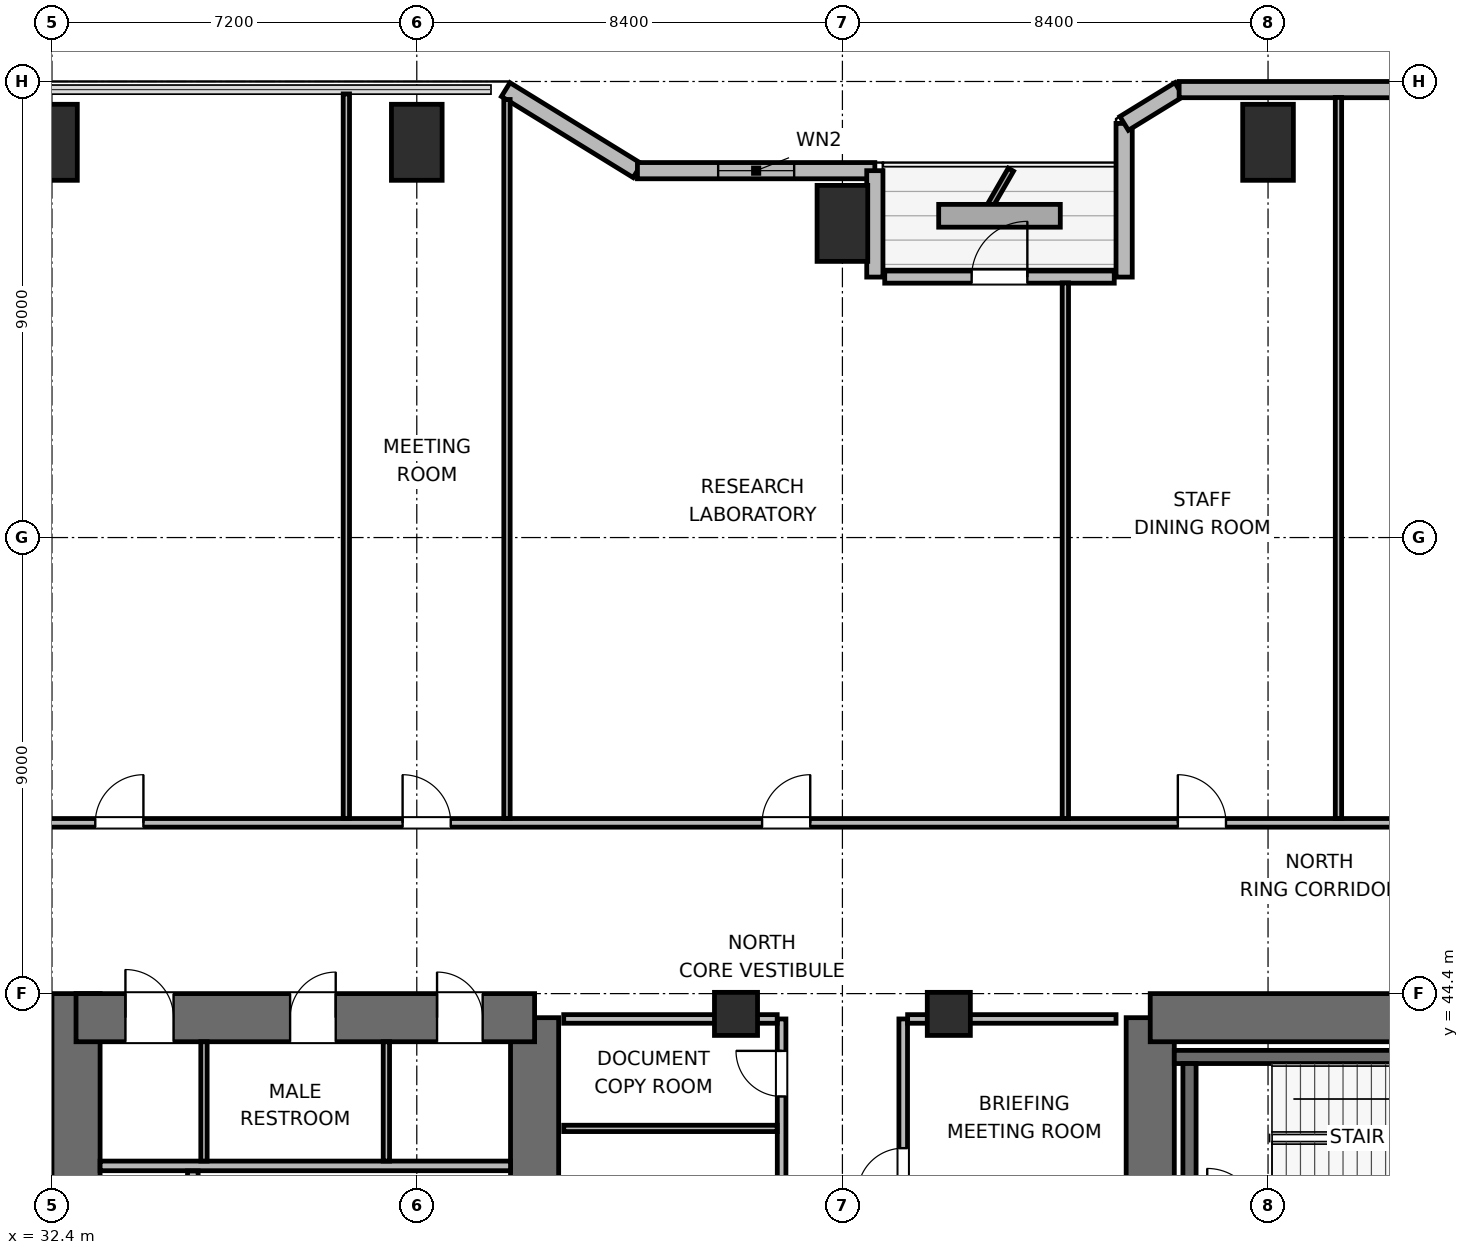
"""IFC4 building model, lengths in metres.
Left out: names, types, materials, properties, quantities, classifications, styles, units other than length and angle.
Written with IfcOpenShell. Run it as: python <this file> out.ifc"""

import sys

from ifc_helpers import new_model, si_unit, direction, frame, frame_2d, origin, origin_2d, place, context, subcontext, project, spatial, rectangle, extrude, element, fill, save


model = new_model("IFC4")
c1 = context("Model", 3, precision=1e-05, world=origin(), true_north=direction((0.0, 1.0)))
c2 = subcontext(c1, "Body", "Model", "MODEL_VIEW")
j1 = project(units=[si_unit("LENGTHUNIT", "METRE"), si_unit("PLANEANGLEUNIT", "RADIAN")], contexts=[c1])
p1 = place(None, origin())
s1 = spatial("IfcSite", under=j1, at=p1, CompositionType="ELEMENT")
p2 = place(p1, origin())
s2 = spatial("IfcBuilding", under=s1, at=p2, CompositionType="ELEMENT")
p3 = place(p2, frame((0.0, 0.0, 85.8)))
s3 = spatial("IfcBuildingStorey", under=s2, at=p3, CompositionType="ELEMENT", Elevation=85.8)
p4 = place(p3, frame((32.875, 27.6, 0.0), z_axis=(0.0, 0.0, 1.0), x_axis=(0.0, 1.0, 0.0)))
e1 = element("IfcWall", 1, at=p4, inside=s3, PredefinedType="SHEAR", context=c2, shape_type="SweptSolid", body=[
    extrude(rectangle(XDim=16.8, YDim=0.95, at=frame_2d((8.4, 0.0))), origin(), (0.0, 0.0, 1.0), 3.9),
])
p5 = place(p3, frame((41.925, 37.8, 0.0), z_axis=(0.0, 0.0, 1.0), x_axis=(0.0, 1.0, 0.0)))
e2 = element("IfcWall", 2, at=p5, inside=s3, PredefinedType="SHEAR", context=c2, shape_type="SweptSolid", body=[
    extrude(rectangle(XDim=6.125, YDim=0.95, at=frame_2d((3.062, 0.0))), origin(), (0.0, 0.0, 1.0), 3.9),
])
p6 = place(p3, frame((32.875, 43.925, 0.0), z_axis=(0.0, 0.0, 1.0), x_axis=(1.0, 0.0, 0.0)))
e3 = element("IfcWall", 3, at=p6, inside=s3, PredefinedType="SHEAR", context=c2, shape_type="SweptSolid", body=[
    extrude(rectangle(XDim=9.05, YDim=0.95, at=frame_2d((4.525, 0.0))), origin(), (0.0, 0.0, 1.0), 3.9),
])
p7 = place(p6, frame((0.975, 0.0, 0.0)))
e4 = element("IfcOpeningElement", 4, at=p7, cuts=e3, PredefinedType="OPENING", context=c2, shape_type="SweptSolid", body=[
    extrude(rectangle(XDim=0.95, YDim=2.04, at=frame_2d((0.475, 1.02))), frame((0.0, 0.485, 0.0), z_axis=(0.0, -1.0, 0.0), x_axis=(1.0, 0.0, 0.0)), (0.0, 0.0, 1.0), 0.97),
])
p8 = place(p6, frame((4.225, 0.0, 0.0)))
e5 = element("IfcOpeningElement", 5, at=p8, cuts=e3, PredefinedType="OPENING", context=c2, shape_type="SweptSolid", body=[
    extrude(rectangle(XDim=0.9, YDim=2.02, at=frame_2d((0.45, 1.01))), frame((0.0, 0.485, 0.0), z_axis=(0.0, -1.0, 0.0), x_axis=(1.0, 0.0, 0.0)), (0.0, 0.0, 1.0), 0.97),
])
p9 = place(p6, frame((7.125, 0.0, 0.0)))
e6 = element("IfcOpeningElement", 6, at=p9, cuts=e3, PredefinedType="OPENING", context=c2, shape_type="SweptSolid", body=[
    extrude(rectangle(XDim=0.9, YDim=2.02, at=frame_2d((0.45, 1.01))), frame((0.0, 0.485, 0.0), z_axis=(0.0, -1.0, 0.0), x_axis=(1.0, 0.0, 0.0)), (0.0, 0.0, 1.0), 0.97),
])
p10 = place(p3, frame((54.075, 38.0, 0.0), z_axis=(0.0, 0.0, 1.0), x_axis=(0.0, 1.0, 0.0)))
e7 = element("IfcWall", 7, at=p10, inside=s3, PredefinedType="SHEAR", context=c2, shape_type="SweptSolid", body=[
    extrude(rectangle(XDim=5.925, YDim=0.95, at=frame_2d((2.962, 0.0))), origin(), (0.0, 0.0, 1.0), 3.9),
])
p11 = place(p3, frame((54.075, 43.925, 0.0), z_axis=(0.0, 0.0, 1.0), x_axis=(1.0, 0.0, 0.0)))
e8 = element("IfcWall", 8, at=p11, inside=s3, PredefinedType="SHEAR", context=c2, shape_type="SweptSolid", body=[
    extrude(rectangle(XDim=9.05, YDim=0.95, at=frame_2d((4.525, 0.0))), origin(), (0.0, 0.0, 1.0), 3.9),
])
p12 = place(p3, frame((54.55, 43.15, 0.0), z_axis=(0.0, 0.0, 1.0), x_axis=(1.0, 0.0, 0.0)))
e9 = element("IfcWall", 9, at=p12, inside=s3, PredefinedType="SHEAR", context=c2, shape_type="SweptSolid", body=[
    extrude(rectangle(XDim=8.1, YDim=0.26, at=frame_2d((4.05, 0.0))), origin(), (0.0, 0.0, 1.0), 3.9),
])
p13 = place(p3, frame((54.85, 40.08, 0.0), z_axis=(0.0, 0.0, 1.0), x_axis=(0.0, 1.0, 0.0)))
e10 = element("IfcWall", 10, at=p13, inside=s3, PredefinedType="SHEAR", context=c2, shape_type="SweptSolid", body=[
    extrude(rectangle(XDim=2.94, YDim=0.26, at=frame_2d((1.47, 0.0))), origin(), (0.0, 0.0, 1.0), 3.9),
])
for number, where, z_axis, x_axis in (
    (11, (32.4, 61.2, 0.0), (0.0, 0.0, 1.0), (1.0, 0.0, 0.0)),
    (12, (39.6, 61.2, 0.0), (0.0, 0.0, 1.0), (1.0, 0.0, 0.0)),
    (13, (48.0, 59.6, 0.0), (0.0, 0.0, 1.0), (1.0, 0.0, 0.0)),
    (14, (56.4, 61.2, 0.0), (0.0, 0.0, 1.0), (1.0, 0.0, 0.0)),
):
    element("IfcColumn", number, at=place(p3, frame(where, z_axis=z_axis, x_axis=x_axis)), inside=s3, PredefinedType="COLUMN", context=c2, shape_type="SweptSolid", body=[
        extrude(rectangle(XDim=1.0, YDim=1.5, at=origin_2d()), origin(), (0.0, 0.0, 1.0), 3.9),
    ])
for number, where, z_axis, x_axis in (
    (15, (45.9, 44.0, 0.0), (0.0, 0.0, 1.0), (1.0, 0.0, 0.0)),
    (16, (50.1, 44.0, 0.0), (0.0, 0.0, 1.0), (1.0, 0.0, 0.0)),
):
    element("IfcColumn", number, at=place(p3, frame(where, z_axis=z_axis, x_axis=x_axis)), inside=s3, PredefinedType="COLUMN", context=c2, shape_type="SweptSolid", body=[
        extrude(rectangle(XDim=0.85, YDim=0.85, at=origin_2d()), origin(), (0.0, 0.0, 1.0), 3.9),
    ])
p14 = place(p3, frame((41.355, 62.24, 0.0), z_axis=(0.0, 0.0, 1.0), x_axis=(0.851630857047, -0.524142044989, 0.0)))
e17 = element("IfcWall", 17, at=p14, inside=s3, PredefinedType="SOLIDWALL", context=c2, shape_type="SweptSolid", body=[
    extrude(rectangle(XDim=3.053, YDim=0.32, at=frame_2d((1.526, 0.0))), origin(), (0.0, 0.0, 1.0), 2.875),
])
p15 = place(p3, frame((43.955, 60.64, 0.0), z_axis=(0.0, 0.0, 1.0), x_axis=(1.0, 0.0, 0.0)))
e18 = element("IfcWall", 18, at=p15, inside=s3, PredefinedType="SOLIDWALL", context=c2, shape_type="SweptSolid", body=[
    extrude(rectangle(XDim=4.685, YDim=0.32, at=frame_2d((2.343, 0.0))), origin(), (0.0, 0.0, 1.0), 2.875),
])
p16 = place(p15, frame((1.593, 0.0, 0.85)))
e19 = element("IfcOpeningElement", 19, at=p16, cuts=e18, PredefinedType="OPENING", context=c2, shape_type="SweptSolid", body=[
    extrude(rectangle(XDim=1.5, YDim=1.1, at=frame_2d((0.75, 0.55))), frame((0.0, 0.17, 0.0), z_axis=(0.0, -1.0, 0.0), x_axis=(1.0, 0.0, 0.0)), (0.0, 0.0, 1.0), 0.34),
])
p17 = place(p3, frame((48.64, 60.64, 0.0), z_axis=(0.0, 0.0, 1.0), x_axis=(0.0, -1.0, 0.0)))
e20 = element("IfcWall", 20, at=p17, inside=s3, PredefinedType="SOLIDWALL", context=c2, shape_type="SweptSolid", body=[
    extrude(rectangle(XDim=2.1, YDim=0.32, at=frame_2d((1.05, 0.0))), origin(), (0.0, 0.0, 1.0), 2.875),
])
p18 = place(p3, frame((48.835, 58.54, 0.0), z_axis=(0.0, 0.0, 1.0), x_axis=(1.0, 0.0, 0.0)))
e21 = element("IfcWall", 21, at=p18, inside=s3, PredefinedType="SOLIDWALL", context=c2, shape_type="SweptSolid", body=[
    extrude(rectangle(XDim=4.53, YDim=0.24, at=frame_2d((2.265, 0.0))), origin(), (0.0, 0.0, 1.0), 3.64),
])
p19 = place(p18, frame((1.715, 0.0, 0.0)))
e22 = element("IfcOpeningElement", 22, at=p19, cuts=e21, PredefinedType="OPENING", context=c2, shape_type="SweptSolid", body=[
    extrude(rectangle(XDim=1.1, YDim=2.04, at=frame_2d((0.55, 1.02))), frame((0.0, 0.13, 0.0), z_axis=(0.0, -1.0, 0.0), x_axis=(1.0, 0.0, 0.0)), (0.0, 0.0, 1.0), 0.26),
])
p20 = place(p3, frame((53.56, 58.54, 0.0), z_axis=(0.0, 0.0, 1.0), x_axis=(0.0, 1.0, 0.0)))
e23 = element("IfcWall", 23, at=p20, inside=s3, PredefinedType="SOLIDWALL", context=c2, shape_type="SweptSolid", body=[
    extrude(rectangle(XDim=3.032, YDim=0.32, at=frame_2d((1.516, 0.0))), origin(), (0.0, 0.0, 1.0), 2.875),
])
p21 = place(p3, frame((53.56, 61.573, 0.0), z_axis=(0.0, 0.0, 1.0), x_axis=(0.851776724646, 0.523904964045, 0.0)))
e24 = element("IfcWall", 24, at=p21, inside=s3, PredefinedType="SOLIDWALL", context=c2, shape_type="SweptSolid", body=[
    extrude(rectangle(XDim=1.274, YDim=0.32, at=frame_2d((0.637, 0.0))), origin(), (0.0, 0.0, 1.0), 3.64),
])
p22 = place(p3, frame((54.645, 62.24, 0.0), z_axis=(0.0, 0.0, 1.0), x_axis=(1.0, 0.0, 0.0)))
e25 = element("IfcWall", 25, at=p22, inside=s3, PredefinedType="SOLIDWALL", context=c2, shape_type="SweptSolid", body=[
    extrude(rectangle(XDim=10.734, YDim=0.32, at=frame_2d((5.367, 0.0))), origin(), (0.0, 0.0, 1.0), 3.64),
])
p23 = place(p3, frame((33.35, 41.0, 0.0), z_axis=(0.0, 0.0, 1.0), x_axis=(1.0, 0.0, 0.0)))
e26 = element("IfcWall", 26, at=p23, inside=s3, PredefinedType="PLUMBINGWALL", context=c2, shape_type="SweptSolid", body=[
    extrude(rectangle(XDim=8.1, YDim=0.19, at=frame_2d((4.05, 0.0))), origin(), (0.0, 0.0, 1.0), 3.64),
])
for number, where, z_axis, x_axis in (
    (27, (35.4, 41.095, 0.0), (0.0, 0.0, 1.0), (0.0, 1.0, 0.0)),
    (28, (39.0, 41.095, 0.0), (0.0, 0.0, 1.0), (0.0, 1.0, 0.0)),
):
    element("IfcWall", number, at=place(p3, frame(where, z_axis=z_axis, x_axis=x_axis)), inside=s3, PredefinedType="PARTITIONING", context=c2, shape_type="SweptSolid", body=[
        extrude(rectangle(XDim=2.355, YDim=0.125, at=frame_2d((1.177, 0.0))), origin(), (0.0, 0.0, 1.0), 3.64),
    ])
p24 = place(p3, frame((35.18, 39.74, 0.0), z_axis=(0.0, 0.0, 1.0), x_axis=(0.0, 1.0, 0.0)))
e29 = element("IfcWall", 29, at=p24, inside=s3, PredefinedType="PARTITIONING", context=c2, shape_type="SweptSolid", body=[
    extrude(rectangle(XDim=1.16, YDim=0.21, at=frame_2d((0.58, 0.0))), origin(), (0.0, 0.0, 1.0), 3.64),
])
p25 = place(p24, frame((0.105, 0.0, 0.0)))
e30 = element("IfcOpeningElement", 30, at=p25, cuts=e29, PredefinedType="OPENING", context=c2, shape_type="SweptSolid", body=[
    extrude(rectangle(XDim=0.95, YDim=2.04, at=frame_2d((0.475, 1.02))), frame((0.0, 0.115, 0.0), z_axis=(0.0, -1.0, 0.0), x_axis=(1.0, 0.0, 0.0)), (0.0, 0.0, 1.0), 0.23),
])
p26 = place(p3, frame((46.8, 37.9, 0.0), z_axis=(0.0, 0.0, 1.0), x_axis=(0.0, 1.0, 0.0)))
e31 = element("IfcWall", 31, at=p26, inside=s3, PredefinedType="PARTITIONING", context=c2, shape_type="SweptSolid", body=[
    extrude(rectangle(XDim=6.0, YDim=0.17, at=frame_2d((3.0, 0.0))), origin(), (0.0, 0.0, 1.0), 3.64),
])
p27 = place(p26, frame((1.47, 0.0, 0.0)))
e32 = element("IfcOpeningElement", 32, at=p27, cuts=e31, PredefinedType="OPENING", context=c2, shape_type="SweptSolid", body=[
    extrude(rectangle(XDim=0.9, YDim=2.02, at=frame_2d((0.45, 1.01))), frame((0.0, 0.095, 0.0), z_axis=(0.0, -1.0, 0.0), x_axis=(1.0, 0.0, 0.0)), (0.0, 0.0, 1.0), 0.19),
])
p28 = place(p26, frame((4.47, 0.0, 0.0)))
e33 = element("IfcOpeningElement", 33, at=p28, cuts=e31, PredefinedType="OPENING", context=c2, shape_type="SweptSolid", body=[
    extrude(rectangle(XDim=0.9, YDim=2.02, at=frame_2d((0.45, 1.01))), frame((0.0, 0.095, 0.0), z_axis=(0.0, -1.0, 0.0), x_axis=(1.0, 0.0, 0.0)), (0.0, 0.0, 1.0), 0.19),
])
p29 = place(p3, frame((42.5, 43.9, 0.0), z_axis=(0.0, 0.0, 1.0), x_axis=(1.0, 0.0, 0.0)))
e34 = element("IfcWall", 34, at=p29, inside=s3, PredefinedType="PARTITIONING", context=c2, shape_type="SweptSolid", body=[
    extrude(rectangle(XDim=4.213, YDim=0.17, at=frame_2d((2.106, 0.0))), origin(), (0.0, 0.0, 1.0), 2.525),
])
p30 = place(p3, frame((42.5, 41.74, 0.0), z_axis=(0.0, 0.0, 1.0), x_axis=(1.0, 0.0, 0.0)))
e35 = element("IfcWall", 35, at=p30, inside=s3, PredefinedType="PARTITIONING", context=c2, shape_type="SweptSolid", body=[
    extrude(rectangle(XDim=4.213, YDim=0.125, at=frame_2d((2.106, 0.0))), origin(), (0.0, 0.0, 1.0), 3.64),
])
p31 = place(p3, frame((49.2, 37.9, 0.0), z_axis=(0.0, 0.0, 1.0), x_axis=(0.0, 1.0, 0.0)))
e36 = element("IfcWall", 36, at=p31, inside=s3, PredefinedType="PARTITIONING", context=c2, shape_type="SweptSolid", body=[
    extrude(rectangle(XDim=6.0, YDim=0.17, at=frame_2d((3.0, 0.0))), origin(), (0.0, 0.0, 1.0), 3.64),
])
p32 = place(p31, frame((2.55, 0.0, 0.0)))
e37 = element("IfcOpeningElement", 37, at=p32, cuts=e36, PredefinedType="OPENING", context=c2, shape_type="SweptSolid", body=[
    extrude(rectangle(XDim=0.9, YDim=2.02, at=frame_2d((0.45, 1.01))), frame((0.0, 0.095, 0.0), z_axis=(0.0, -1.0, 0.0), x_axis=(1.0, 0.0, 0.0)), (0.0, 0.0, 1.0), 0.19),
])
p33 = place(p3, frame((49.287, 43.9, 0.0), z_axis=(0.0, 0.0, 1.0), x_axis=(1.0, 0.0, 0.0)))
e38 = element("IfcWall", 38, at=p33, inside=s3, PredefinedType="PARTITIONING", context=c2, shape_type="SweptSolid", body=[
    extrude(rectangle(XDim=4.113, YDim=0.17, at=frame_2d((2.056, 0.0))), origin(), (0.0, 0.0, 1.0), 2.525),
])
p34 = place(p3, frame((29.25, 47.77, 0.0), z_axis=(0.0, 0.0, 1.0), x_axis=(1.0, 0.0, 0.0)))
e39 = element("IfcWall", 39, at=p34, inside=s3, PredefinedType="PARTITIONING", context=c2, shape_type="SweptSolid", body=[
    extrude(rectangle(XDim=37.5, YDim=0.17, at=frame_2d((18.75, 0.0))), origin(), (0.0, 0.0, 1.0), 3.64),
])
p35 = place(p34, frame((4.005, 0.0, 0.0)))
e40 = element("IfcOpeningElement", 40, at=p35, cuts=e39, PredefinedType="OPENING", context=c2, shape_type="SweptSolid", body=[
    extrude(rectangle(XDim=0.95, YDim=2.04, at=frame_2d((0.475, 1.02))), frame((0.0, 0.095, 0.0), z_axis=(0.0, -1.0, 0.0), x_axis=(1.0, 0.0, 0.0)), (0.0, 0.0, 1.0), 0.19),
])
p36 = place(p34, frame((10.07, 0.0, 0.0)))
e41 = element("IfcOpeningElement", 41, at=p36, cuts=e39, PredefinedType="OPENING", context=c2, shape_type="SweptSolid", body=[
    extrude(rectangle(XDim=0.95, YDim=2.04, at=frame_2d((0.475, 1.02))), frame((0.0, 0.095, 0.0), z_axis=(0.0, -1.0, 0.0), x_axis=(1.0, 0.0, 0.0)), (0.0, 0.0, 1.0), 0.19),
])
p37 = place(p34, frame((17.165, 0.0, 0.0)))
e42 = element("IfcOpeningElement", 42, at=p37, cuts=e39, PredefinedType="OPENING", context=c2, shape_type="SweptSolid", body=[
    extrude(rectangle(XDim=0.95, YDim=2.04, at=frame_2d((0.475, 1.02))), frame((0.0, 0.095, 0.0), z_axis=(0.0, -1.0, 0.0), x_axis=(1.0, 0.0, 0.0)), (0.0, 0.0, 1.0), 0.19),
])
p38 = place(p34, frame((25.37, 0.0, 0.0)))
e43 = element("IfcOpeningElement", 43, at=p38, cuts=e39, PredefinedType="OPENING", context=c2, shape_type="SweptSolid", body=[
    extrude(rectangle(XDim=0.95, YDim=2.04, at=frame_2d((0.475, 1.02))), frame((0.0, 0.095, 0.0), z_axis=(0.0, -1.0, 0.0), x_axis=(1.0, 0.0, 0.0)), (0.0, 0.0, 1.0), 0.19),
])
p39 = place(p34, frame((32.545, 0.0, 0.0)))
e44 = element("IfcOpeningElement", 44, at=p39, cuts=e39, PredefinedType="OPENING", context=c2, shape_type="SweptSolid", body=[
    extrude(rectangle(XDim=0.95, YDim=2.04, at=frame_2d((0.475, 1.02))), frame((0.0, 0.095, 0.0), z_axis=(0.0, -1.0, 0.0), x_axis=(1.0, 0.0, 0.0)), (0.0, 0.0, 1.0), 0.19),
])
p40 = place(p3, frame((38.21, 47.857, 0.0), z_axis=(0.0, 0.0, 1.0), x_axis=(0.0, 1.0, 0.0)))
e45 = element("IfcWall", 45, at=p40, inside=s3, PredefinedType="PARTITIONING", context=c2, shape_type="SweptSolid", body=[
    extrude(rectangle(XDim=14.298, YDim=0.125, at=frame_2d((7.149, 0.0))), origin(), (0.0, 0.0, 1.0), 3.64),
])
p41 = place(p3, frame((41.38, 47.857, 0.0), z_axis=(0.0, 0.0, 1.0), x_axis=(0.0, 1.0, 0.0)))
e46 = element("IfcWall", 46, at=p41, inside=s3, PredefinedType="PARTITIONING", context=c2, shape_type="SweptSolid", body=[
    extrude(rectangle(XDim=14.188, YDim=0.125, at=frame_2d((7.094, 0.0))), origin(), (0.0, 0.0, 1.0), 3.003),
])
p42 = place(p3, frame((52.4, 47.857, 0.0), z_axis=(0.0, 0.0, 1.0), x_axis=(0.0, 1.0, 0.0)))
e47 = element("IfcWall", 47, at=p42, inside=s3, PredefinedType="PARTITIONING", context=c2, shape_type="SweptSolid", body=[
    extrude(rectangle(XDim=10.568, YDim=0.125, at=frame_2d((5.284, 0.0))), origin(), (0.0, 0.0, 1.0), 3.003),
])
p43 = place(p3, frame((57.79, 47.857, 0.0), z_axis=(0.0, 0.0, 1.0), x_axis=(0.0, 1.0, 0.0)))
e48 = element("IfcWall", 48, at=p43, inside=s3, PredefinedType="PARTITIONING", context=c2, shape_type="SweptSolid", body=[
    extrude(rectangle(XDim=14.228, YDim=0.125, at=frame_2d((7.114, 0.0))), origin(), (0.0, 0.0, 1.0), 3.64),
])
p44 = place(p16, origin())
e49 = element("IfcWindow", 49, at=p44, inside=s3, PartitioningType="SINGLE_PANEL", PredefinedType="WINDOW", context=c2, shape_type="SweptSolid", body=[
    extrude(rectangle(XDim=1.5, YDim=1.1, at=frame_2d((0.75, 0.55))), frame((0.0, 0.03, 0.0), z_axis=(0.0, -1.0, 0.0), x_axis=(1.0, 0.0, 0.0)), (0.0, 0.0, 1.0), 0.06),
])
fill(e19, e49)
p45 = place(p19, origin())
e50 = element("IfcDoor", 50, at=p45, inside=s3, OperationType="SINGLE_SWING_RIGHT", PredefinedType="DOOR", context=c2, shape_type="SweptSolid", body=[
    extrude(rectangle(XDim=1.1, YDim=2.04, at=frame_2d((0.55, 1.02))), frame((0.0, 0.025, 0.0), z_axis=(0.0, -1.0, 0.0), x_axis=(1.0, 0.0, 0.0)), (0.0, 0.0, 1.0), 0.05),
])
fill(e22, e50)
p46 = place(p7, origin())
e51 = element("IfcDoor", 51, at=p46, inside=s3, OperationType="SINGLE_SWING_LEFT", PredefinedType="DOOR", context=c2, shape_type="SweptSolid", body=[
    extrude(rectangle(XDim=0.95, YDim=2.04, at=frame_2d((0.475, 1.02))), frame((0.0, 0.025, 0.0), z_axis=(0.0, -1.0, 0.0), x_axis=(1.0, 0.0, 0.0)), (0.0, 0.0, 1.0), 0.05),
])
fill(e4, e51)
p47 = place(p8, origin())
e52 = element("IfcDoor", 52, at=p47, inside=s3, OperationType="SINGLE_SWING_RIGHT", PredefinedType="DOOR", context=c2, shape_type="SweptSolid", body=[
    extrude(rectangle(XDim=0.9, YDim=2.02, at=frame_2d((0.45, 1.01))), frame((0.0, 0.025, 0.0), z_axis=(0.0, -1.0, 0.0), x_axis=(1.0, 0.0, 0.0)), (0.0, 0.0, 1.0), 0.05),
])
fill(e5, e52)
p48 = place(p9, origin())
e53 = element("IfcDoor", 53, at=p48, inside=s3, OperationType="SINGLE_SWING_LEFT", PredefinedType="DOOR", context=c2, shape_type="SweptSolid", body=[
    extrude(rectangle(XDim=0.9, YDim=2.02, at=frame_2d((0.45, 1.01))), frame((0.0, 0.025, 0.0), z_axis=(0.0, -1.0, 0.0), x_axis=(1.0, 0.0, 0.0)), (0.0, 0.0, 1.0), 0.05),
])
fill(e6, e53)
p49 = place(p28, origin())
e54 = element("IfcDoor", 54, at=p49, inside=s3, OperationType="SINGLE_SWING_RIGHT", PredefinedType="DOOR", context=c2, shape_type="SweptSolid", body=[
    extrude(rectangle(XDim=0.9, YDim=2.02, at=frame_2d((0.45, 1.01))), frame((0.0, 0.025, 0.0), z_axis=(0.0, -1.0, 0.0), x_axis=(1.0, 0.0, 0.0)), (0.0, 0.0, 1.0), 0.05),
])
fill(e33, e54)
p50 = place(p32, origin())
e55 = element("IfcDoor", 55, at=p50, inside=s3, OperationType="SINGLE_SWING_LEFT", PredefinedType="DOOR", context=c2, shape_type="SweptSolid", body=[
    extrude(rectangle(XDim=0.9, YDim=2.02, at=frame_2d((0.45, 1.01))), frame((0.0, 0.025, 0.0), z_axis=(0.0, -1.0, 0.0), x_axis=(1.0, 0.0, 0.0)), (0.0, 0.0, 1.0), 0.05),
])
fill(e37, e55)
p51 = place(p35, origin())
e56 = element("IfcDoor", 56, at=p51, inside=s3, OperationType="SINGLE_SWING_RIGHT", PredefinedType="DOOR", context=c2, shape_type="SweptSolid", body=[
    extrude(rectangle(XDim=0.95, YDim=2.04, at=frame_2d((0.475, 1.02))), frame((0.0, 0.025, 0.0), z_axis=(0.0, -1.0, 0.0), x_axis=(1.0, 0.0, 0.0)), (0.0, 0.0, 1.0), 0.05),
])
fill(e40, e56)
p52 = place(p36, origin())
e57 = element("IfcDoor", 57, at=p52, inside=s3, OperationType="SINGLE_SWING_LEFT", PredefinedType="DOOR", context=c2, shape_type="SweptSolid", body=[
    extrude(rectangle(XDim=0.95, YDim=2.04, at=frame_2d((0.475, 1.02))), frame((0.0, 0.025, 0.0), z_axis=(0.0, -1.0, 0.0), x_axis=(1.0, 0.0, 0.0)), (0.0, 0.0, 1.0), 0.05),
])
fill(e41, e57)
p53 = place(p37, origin())
e58 = element("IfcDoor", 58, at=p53, inside=s3, OperationType="SINGLE_SWING_RIGHT", PredefinedType="DOOR", context=c2, shape_type="SweptSolid", body=[
    extrude(rectangle(XDim=0.95, YDim=2.04, at=frame_2d((0.475, 1.02))), frame((0.0, 0.025, 0.0), z_axis=(0.0, -1.0, 0.0), x_axis=(1.0, 0.0, 0.0)), (0.0, 0.0, 1.0), 0.05),
])
fill(e42, e58)
p54 = place(p38, origin())
e59 = element("IfcDoor", 59, at=p54, inside=s3, OperationType="SINGLE_SWING_LEFT", PredefinedType="DOOR", context=c2, shape_type="SweptSolid", body=[
    extrude(rectangle(XDim=0.95, YDim=2.04, at=frame_2d((0.475, 1.02))), frame((0.0, 0.025, 0.0), z_axis=(0.0, -1.0, 0.0), x_axis=(1.0, 0.0, 0.0)), (0.0, 0.0, 1.0), 0.05),
])
fill(e43, e59)
save(model, sys.argv[1])
